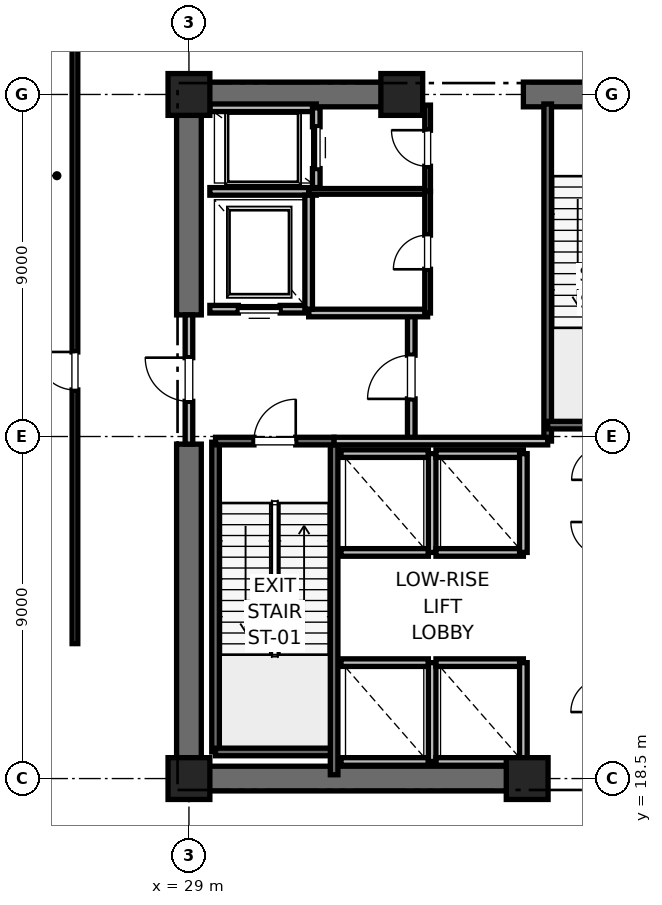
"""IFC4 building model, lengths in metres.
Left out: names, types, materials, properties, quantities, classifications, styles, units other than length and angle.
Written with IfcOpenShell. Run it as: python <this file> out.ifc"""

import sys

from ifc_helpers import new_model, si_unit, direction, frame, frame_2d, origin, origin_2d, place, context, subcontext, project, spatial, rectangle, extrude, element, fill, save


model = new_model("IFC4")
c1 = context("Model", 3, precision=1e-05, world=origin(), true_north=direction((0.0, 1.0)))
c2 = subcontext(c1, "Body", "Model", "MODEL_VIEW")
j1 = project(units=[si_unit("LENGTHUNIT", "METRE"), si_unit("PLANEANGLEUNIT", "RADIAN")], contexts=[c1])
p1 = place(None, origin())
s1 = spatial("IfcSite", under=j1, at=p1, CompositionType="ELEMENT")
p2 = place(p1, origin())
s2 = spatial("IfcBuilding", under=s1, at=p2, CompositionType="ELEMENT")
p3 = place(p2, frame((0.0, 0.0, 16.4)))
s3 = spatial("IfcBuildingStorey", under=s2, at=p3, CompositionType="ELEMENT", Elevation=16.4)
for number, where, z_axis, x_axis in (
    (1, (29.0, 18.5, 0.0), (0.0, 0.0, 1.0), (1.0, 0.0, 0.0)),
    (2, (29.0, 36.5, 0.0), (0.0, 0.0, 1.0), (1.0, 0.0, 0.0)),
    (3, (37.9, 18.5, 0.0), (0.0, 0.0, 1.0), (1.0, 0.0, 0.0)),
    (4, (34.6, 36.5, 0.0), (0.0, 0.0, 1.0), (1.0, 0.0, 0.0)),
):
    element("IfcColumn", number, at=place(p3, frame(where, z_axis=z_axis, x_axis=x_axis)), inside=s3, PredefinedType="PILASTER", context=c2, shape_type="SweptSolid", body=[
        extrude(rectangle(XDim=1.1, YDim=1.1, at=origin_2d()), origin(), (0.0, 0.0, 1.0), 5.2),
    ])
p4 = place(p3, frame((29.0, 18.5, 0.0), z_axis=(0.0, 0.0, 1.0), x_axis=(1.0, 0.0, 0.0)))
e5 = element("IfcWall", 5, at=p4, inside=s3, PredefinedType="SHEAR", context=c2, shape_type="SweptSolid", body=[
    extrude(rectangle(XDim=9.2, YDim=0.65, at=frame_2d((4.6, 0.0))), origin(), (0.0, 0.0, 1.0), 4.9),
])
p5 = place(p3, frame((29.0, 36.5, 0.0), z_axis=(0.0, 0.0, 1.0), x_axis=(1.0, 0.0, 0.0)))
e6 = element("IfcWall", 6, at=p5, inside=s3, PredefinedType="SHEAR", context=c2, shape_type="SweptSolid", body=[
    extrude(rectangle(XDim=5.8, YDim=0.65, at=frame_2d((2.9, 0.0))), origin(), (0.0, 0.0, 1.0), 4.9),
])
p6 = place(p3, frame((37.8, 36.5, 0.0), z_axis=(0.0, 0.0, 1.0), x_axis=(1.0, 0.0, 0.0)))
e7 = element("IfcWall", 7, at=p6, inside=s3, PredefinedType="SHEAR", context=c2, shape_type="SweptSolid", body=[
    extrude(rectangle(XDim=4.4, YDim=0.65, at=frame_2d((2.2, 0.0))), origin(), (0.0, 0.0, 1.0), 4.9),
])
p7 = place(p6, frame((1.65, 0.0, 0.0)))
e8 = element("IfcOpeningElement", 8, at=p7, cuts=e7, PredefinedType="OPENING", context=c2, shape_type="SweptSolid", body=[
    extrude(rectangle(XDim=1.1, YDim=2.15, at=frame_2d((0.55, 1.075))), frame((0.0, 0.325, 0.0), z_axis=(0.0, -1.0, 0.0), x_axis=(1.0, 0.0, 0.0)), (0.0, 0.0, 1.0), 0.65),
])
p8 = place(p3, frame((29.0, 18.5, 0.0), z_axis=(0.0, 0.0, 1.0), x_axis=(0.0, 1.0, 0.0)))
e9 = element("IfcWall", 9, at=p8, inside=s3, PredefinedType="SHEAR", context=c2, shape_type="SweptSolid", body=[
    extrude(rectangle(XDim=8.8, YDim=0.65, at=frame_2d((4.4, 0.0))), origin(), (0.0, 0.0, 1.0), 4.9),
])
p9 = place(p3, frame((29.0, 30.7, 0.0), z_axis=(0.0, 0.0, 1.0), x_axis=(0.0, 1.0, 0.0)))
e10 = element("IfcWall", 10, at=p9, inside=s3, PredefinedType="SHEAR", context=c2, shape_type="SweptSolid", body=[
    extrude(rectangle(XDim=5.8, YDim=0.65, at=frame_2d((2.9, 0.0))), origin(), (0.0, 0.0, 1.0), 4.9),
])
p10 = place(p3, frame((29.7, 19.2, 0.0), z_axis=(0.0, 0.0, 1.0), x_axis=(0.0, 1.0, 0.0)))
e11 = element("IfcWall", 11, at=p10, inside=s3, PredefinedType="SOLIDWALL", context=c2, shape_type="SweptSolid", body=[
    extrude(rectangle(XDim=8.15, YDim=0.2, at=frame_2d((4.075, 0.0))), origin(), (0.0, 0.0, 1.0), 4.9),
])
p11 = place(p3, frame((29.7, 19.2, 0.0), z_axis=(0.0, 0.0, 1.0), x_axis=(1.0, 0.0, 0.0)))
e12 = element("IfcWall", 12, at=p11, inside=s3, PredefinedType="SOLIDWALL", context=c2, shape_type="SweptSolid", body=[
    extrude(rectangle(XDim=3.12, YDim=0.2, at=frame_2d((1.56, 0.0))), origin(), (0.0, 0.0, 1.0), 4.9),
])
p12 = place(p3, frame((32.82, 18.6, 0.0), z_axis=(0.0, 0.0, 1.0), x_axis=(0.0, 1.0, 0.0)))
e13 = element("IfcWall", 13, at=p12, inside=s3, PredefinedType="SOLIDWALL", context=c2, shape_type="SweptSolid", body=[
    extrude(rectangle(XDim=8.78, YDim=0.2, at=frame_2d((4.39, 0.0))), origin(), (0.0, 0.0, 1.0), 4.9),
])
p13 = place(p3, frame((29.7, 27.38, 0.0), z_axis=(0.0, 0.0, 1.0), x_axis=(1.0, 0.0, 0.0)))
e14 = element("IfcWall", 14, at=p13, inside=s3, PredefinedType="SOLIDWALL", context=c2, shape_type="SweptSolid", body=[
    extrude(rectangle(XDim=3.12, YDim=0.2, at=frame_2d((1.56, 0.0))), origin(), (0.0, 0.0, 1.0), 4.9),
])
p14 = place(p13, frame((1.01, 0.0, 0.0)))
e15 = element("IfcOpeningElement", 15, at=p14, cuts=e14, PredefinedType="OPENING", context=c2, shape_type="SweptSolid", body=[
    extrude(rectangle(XDim=1.1, YDim=2.15, at=frame_2d((0.55, 1.075))), frame((0.0, 0.1, 0.0), z_axis=(0.0, -1.0, 0.0), x_axis=(1.0, 0.0, 0.0)), (0.0, 0.0, 1.0), 0.2),
])
p15 = place(p3, frame((38.44, 27.38, 0.0), z_axis=(0.0, 0.0, 1.0), x_axis=(0.0, 1.0, 0.0)))
e16 = element("IfcWall", 16, at=p15, inside=s3, PredefinedType="SOLIDWALL", context=c2, shape_type="SweptSolid", body=[
    extrude(rectangle(XDim=8.87, YDim=0.2, at=frame_2d((4.435, 0.0))), origin(), (0.0, 0.0, 1.0), 4.9),
])
p16 = place(p3, frame((38.44, 27.8, 0.0), z_axis=(0.0, 0.0, 1.0), x_axis=(1.0, 0.0, 0.0)))
e17 = element("IfcWall", 17, at=p16, inside=s3, PredefinedType="SOLIDWALL", context=c2, shape_type="SweptSolid", body=[
    extrude(rectangle(XDim=3.32, YDim=0.2, at=frame_2d((1.66, 0.0))), origin(), (0.0, 0.0, 1.0), 4.9),
])
p17 = place(p3, frame((34.85, 27.38, 0.0), z_axis=(0.0, 0.0, 1.0), x_axis=(0.0, 1.0, 0.0)))
e18 = element("IfcWall", 18, at=p17, inside=s3, PredefinedType="PARTITIONING", context=c2, shape_type="SweptSolid", body=[
    extrude(rectangle(XDim=3.37, YDim=0.2, at=frame_2d((1.685, 0.0))), origin(), (0.0, 0.0, 1.0), 4.9),
])
p18 = place(p17, frame((1.11, 0.0, 0.0)))
e19 = element("IfcOpeningElement", 19, at=p18, cuts=e18, PredefinedType="OPENING", context=c2, shape_type="SweptSolid", body=[
    extrude(rectangle(XDim=1.15, YDim=2.2, at=frame_2d((0.575, 1.1))), frame((0.0, 0.1, 0.0), z_axis=(0.0, -1.0, 0.0), x_axis=(1.0, 0.0, 0.0)), (0.0, 0.0, 1.0), 0.2),
])
p19 = place(p3, frame((29.0, 27.3, 0.0), z_axis=(0.0, 0.0, 1.0), x_axis=(0.0, 1.0, 0.0)))
e20 = element("IfcWall", 20, at=p19, inside=s3, PredefinedType="PARTITIONING", context=c2, shape_type="SweptSolid", body=[
    extrude(rectangle(XDim=3.4, YDim=0.2, at=frame_2d((1.7, 0.0))), origin(), (0.0, 0.0, 1.0), 3.68),
])
p20 = place(p19, frame((1.125, 0.0, 0.0)))
e21 = element("IfcOpeningElement", 21, at=p20, cuts=e20, PredefinedType="OPENING", context=c2, shape_type="SweptSolid", body=[
    extrude(rectangle(XDim=1.15, YDim=2.2, at=frame_2d((0.575, 1.1))), frame((0.0, 0.1, 0.0), z_axis=(0.0, -1.0, 0.0), x_axis=(1.0, 0.0, 0.0)), (0.0, 0.0, 1.0), 0.2),
])
p21 = place(p3, frame((32.82, 27.38, 0.0), z_axis=(0.0, 0.0, 1.0), x_axis=(1.0, 0.0, 0.0)))
e22 = element("IfcWall", 22, at=p21, inside=s3, PredefinedType="PARTITIONING", context=c2, shape_type="SweptSolid", body=[
    extrude(rectangle(XDim=5.62, YDim=0.2, at=frame_2d((2.81, 0.0))), origin(), (0.0, 0.0, 1.0), 4.9),
])
p22 = place(p3, frame((32.15, 30.75, 0.0), z_axis=(0.0, 0.0, 1.0), x_axis=(1.0, 0.0, 0.0)))
e23 = element("IfcWall", 23, at=p22, inside=s3, PredefinedType="PARTITIONING", context=c2, shape_type="SweptSolid", body=[
    extrude(rectangle(XDim=3.13, YDim=0.2, at=frame_2d((1.565, 0.0))), origin(), (0.0, 0.0, 1.0), 4.9),
])
p23 = place(p3, frame((29.55, 30.85, 0.0), z_axis=(0.0, 0.0, 1.0), x_axis=(1.0, 0.0, 0.0)))
e24 = element("IfcWall", 24, at=p23, inside=s3, PredefinedType="SOLIDWALL", context=c2, shape_type="SweptSolid", body=[
    extrude(rectangle(XDim=2.6, YDim=0.2, at=frame_2d((1.3, 0.0))), origin(), (0.0, 0.0, 1.0), 3.68),
])
p24 = place(p23, frame((0.75, 0.0, 0.0)))
e25 = element("IfcOpeningElement", 25, at=p24, cuts=e24, PredefinedType="OPENING", context=c2, shape_type="SweptSolid", body=[
    extrude(rectangle(XDim=1.1, YDim=2.2, at=frame_2d((0.55, 1.1))), frame((0.0, 0.1, 0.0), z_axis=(0.0, -1.0, 0.0), x_axis=(1.0, 0.0, 0.0)), (0.0, 0.0, 1.0), 0.2),
])
p25 = place(p3, frame((29.55, 33.95, 0.0), z_axis=(0.0, 0.0, 1.0), x_axis=(1.0, 0.0, 0.0)))
e26 = element("IfcWall", 26, at=p25, inside=s3, PredefinedType="SOLIDWALL", context=c2, shape_type="SweptSolid", body=[
    extrude(rectangle(XDim=2.8, YDim=0.2, at=frame_2d((1.4, 0.0))), origin(), (0.0, 0.0, 1.0), 4.9),
])
p26 = place(p3, frame((32.15, 30.85, 0.0), z_axis=(0.0, 0.0, 1.0), x_axis=(0.0, 1.0, 0.0)))
e27 = element("IfcWall", 27, at=p26, inside=s3, PredefinedType="SOLIDWALL", context=c2, shape_type="SweptSolid", body=[
    extrude(rectangle(XDim=3.0, YDim=0.2, at=frame_2d((1.5, 0.0))), origin(), (0.0, 0.0, 1.0), 4.9),
])
p27 = place(p3, frame((32.35, 36.15, 0.0), z_axis=(0.0, 0.0, 1.0), x_axis=(-1.0, 0.0, 0.0)))
e28 = element("IfcWall", 28, at=p27, inside=s3, PredefinedType="SOLIDWALL", context=c2, shape_type="SweptSolid", body=[
    extrude(rectangle(XDim=2.8, YDim=0.2, at=frame_2d((1.4, 0.0))), origin(), (0.0, 0.0, 1.0), 3.959),
])
p28 = place(p3, frame((32.35, 34.05, 0.0), z_axis=(0.0, 0.0, 1.0), x_axis=(0.0, 1.0, 0.0)))
e29 = element("IfcWall", 29, at=p28, inside=s3, PredefinedType="SOLIDWALL", context=c2, shape_type="SweptSolid", body=[
    extrude(rectangle(XDim=2.1, YDim=0.2, at=frame_2d((1.05, 0.0))), origin(), (0.0, 0.0, 1.0), 4.9),
])
p29 = place(p28, frame((0.5, 0.0, 0.0)))
e30 = element("IfcOpeningElement", 30, at=p29, cuts=e29, PredefinedType="OPENING", context=c2, shape_type="SweptSolid", body=[
    extrude(rectangle(XDim=1.1, YDim=2.2, at=frame_2d((0.55, 1.1))), frame((0.0, 0.1, 0.0), z_axis=(0.0, -1.0, 0.0), x_axis=(1.0, 0.0, 0.0)), (0.0, 0.0, 1.0), 0.2),
])
for number, where, z_axis, x_axis in (
    (31, (33.0, 18.95, 0.0), (0.0, 0.0, 1.0), (1.0, 0.0, 0.0)),
    (32, (35.3, 21.55, 0.0), (0.0, 0.0, 1.0), (-1.0, 0.0, 0.0)),
):
    element("IfcWall", number, at=place(p3, frame(where, z_axis=z_axis, x_axis=x_axis)), inside=s3, PredefinedType="SOLIDWALL", context=c2, shape_type="SweptSolid", body=[
        extrude(rectangle(XDim=2.3, YDim=0.2, at=frame_2d((1.15, 0.0))), origin(), (0.0, 0.0, 1.0), 4.9),
    ])
p30 = place(p3, frame((35.4, 18.95, 0.0), z_axis=(0.0, 0.0, 1.0), x_axis=(0.0, 1.0, 0.0)))
e33 = element("IfcWall", 33, at=p30, inside=s3, PredefinedType="SOLIDWALL", context=c2, shape_type="SweptSolid", body=[
    extrude(rectangle(XDim=2.6, YDim=0.2, at=frame_2d((1.3, 0.0))), origin(), (0.0, 0.0, 1.0), 4.9),
])
p31 = place(p3, frame((35.5, 18.95, 0.0), z_axis=(0.0, 0.0, 1.0), x_axis=(1.0, 0.0, 0.0)))
e34 = element("IfcWall", 34, at=p31, inside=s3, PredefinedType="SOLIDWALL", context=c2, shape_type="SweptSolid", body=[
    extrude(rectangle(XDim=2.3, YDim=0.2, at=frame_2d((1.15, 0.0))), origin(), (0.0, 0.0, 1.0), 3.68),
])
p32 = place(p3, frame((37.8, 21.55, 0.0), z_axis=(0.0, 0.0, 1.0), x_axis=(-1.0, 0.0, 0.0)))
e35 = element("IfcWall", 35, at=p32, inside=s3, PredefinedType="SOLIDWALL", context=c2, shape_type="SweptSolid", body=[
    extrude(rectangle(XDim=2.3, YDim=0.2, at=frame_2d((1.15, 0.0))), origin(), (0.0, 0.0, 1.0), 4.9),
])
p33 = place(p3, frame((37.8, 18.95, 0.0), z_axis=(0.0, 0.0, 1.0), x_axis=(0.0, 1.0, 0.0)))
e36 = element("IfcWall", 36, at=p33, inside=s3, PredefinedType="SOLIDWALL", context=c2, shape_type="SweptSolid", body=[
    extrude(rectangle(XDim=2.6, YDim=0.2, at=frame_2d((1.3, 0.0))), origin(), (0.0, 0.0, 1.0), 3.68),
])
for number, where, z_axis, x_axis in (
    (37, (33.0, 24.45, 0.0), (0.0, 0.0, 1.0), (1.0, 0.0, 0.0)),
    (38, (35.3, 27.05, 0.0), (0.0, 0.0, 1.0), (-1.0, 0.0, 0.0)),
):
    element("IfcWall", number, at=place(p3, frame(where, z_axis=z_axis, x_axis=x_axis)), inside=s3, PredefinedType="SOLIDWALL", context=c2, shape_type="SweptSolid", body=[
        extrude(rectangle(XDim=2.3, YDim=0.2, at=frame_2d((1.15, 0.0))), origin(), (0.0, 0.0, 1.0), 4.9),
    ])
p34 = place(p3, frame((35.4, 24.45, 0.0), z_axis=(0.0, 0.0, 1.0), x_axis=(0.0, 1.0, 0.0)))
e39 = element("IfcWall", 39, at=p34, inside=s3, PredefinedType="SOLIDWALL", context=c2, shape_type="SweptSolid", body=[
    extrude(rectangle(XDim=2.6, YDim=0.2, at=frame_2d((1.3, 0.0))), origin(), (0.0, 0.0, 1.0), 4.9),
])
for number, where, z_axis, x_axis in (
    (40, (35.5, 24.45, 0.0), (0.0, 0.0, 1.0), (1.0, 0.0, 0.0)),
    (41, (37.8, 27.05, 0.0), (0.0, 0.0, 1.0), (-1.0, 0.0, 0.0)),
):
    element("IfcWall", number, at=place(p3, frame(where, z_axis=z_axis, x_axis=x_axis)), inside=s3, PredefinedType="SOLIDWALL", context=c2, shape_type="SweptSolid", body=[
        extrude(rectangle(XDim=2.3, YDim=0.2, at=frame_2d((1.15, 0.0))), origin(), (0.0, 0.0, 1.0), 4.9),
    ])
p35 = place(p3, frame((37.8, 24.45, 0.0), z_axis=(0.0, 0.0, 1.0), x_axis=(0.0, 1.0, 0.0)))
e42 = element("IfcWall", 42, at=p35, inside=s3, PredefinedType="SOLIDWALL", context=c2, shape_type="SweptSolid", body=[
    extrude(rectangle(XDim=2.6, YDim=0.2, at=frame_2d((1.3, 0.0))), origin(), (0.0, 0.0, 1.0), 4.9),
])
p36 = place(p3, frame((32.15, 33.95, 0.0), z_axis=(0.0, 0.0, 1.0), x_axis=(1.0, 0.0, 0.0)))
e43 = element("IfcWall", 43, at=p36, inside=s3, PredefinedType="PARTITIONING", context=c2, shape_type="SweptSolid", body=[
    extrude(rectangle(XDim=3.13, YDim=0.15, at=frame_2d((1.565, 0.0))), origin(), (0.0, 0.0, 1.0), 2.85),
])
p37 = place(p3, frame((35.28, 33.95, 0.0), z_axis=(0.0, 0.0, 1.0), x_axis=(0.0, 1.0, 0.0)))
e44 = element("IfcWall", 44, at=p37, inside=s3, PredefinedType="PARTITIONING", context=c2, shape_type="SweptSolid", body=[
    extrude(rectangle(XDim=2.27, YDim=0.15, at=frame_2d((1.135, 0.0))), origin(), (0.0, 0.0, 1.0), 2.85),
])
p38 = place(p37, frame((0.66, 0.0, 0.0)))
e45 = element("IfcOpeningElement", 45, at=p38, cuts=e44, PredefinedType="OPENING", context=c2, shape_type="SweptSolid", body=[
    extrude(rectangle(XDim=0.95, YDim=2.15, at=frame_2d((0.475, 1.075))), frame((0.0, 0.075, 0.0), z_axis=(0.0, -1.0, 0.0), x_axis=(1.0, 0.0, 0.0)), (0.0, 0.0, 1.0), 0.15),
])
p39 = place(p3, frame((35.28, 30.75, 0.0), z_axis=(0.0, 0.0, 1.0), x_axis=(0.0, 1.0, 0.0)))
e46 = element("IfcWall", 46, at=p39, inside=s3, PredefinedType="PARTITIONING", context=c2, shape_type="SweptSolid", body=[
    extrude(rectangle(XDim=3.2, YDim=0.15, at=frame_2d((1.6, 0.0))), origin(), (0.0, 0.0, 1.0), 2.85),
])
p40 = place(p39, frame((1.15, 0.0, 0.0)))
e47 = element("IfcOpeningElement", 47, at=p40, cuts=e46, PredefinedType="OPENING", context=c2, shape_type="SweptSolid", body=[
    extrude(rectangle(XDim=0.9, YDim=2.1, at=frame_2d((0.45, 1.05))), frame((0.0, 0.075, 0.0), z_axis=(0.0, -1.0, 0.0), x_axis=(1.0, 0.0, 0.0)), (0.0, 0.0, 1.0), 0.15),
])
p41 = place(p3, frame((26.0, 22.05, 0.0), z_axis=(0.0, 0.0, 1.0), x_axis=(0.0, 1.0, 0.0)))
e48 = element("IfcWall", 48, at=p41, inside=s3, PredefinedType="PARTITIONING", context=c2, shape_type="SweptSolid", body=[
    extrude(rectangle(XDim=16.95, YDim=0.15, at=frame_2d((8.475, 0.0))), origin(), (0.0, 0.0, 1.0), 2.85),
])
p42 = place(p41, frame((6.675, 0.0, 0.0)))
e49 = element("IfcOpeningElement", 49, at=p42, cuts=e48, PredefinedType="OPENING", context=c2, shape_type="SweptSolid", body=[
    extrude(rectangle(XDim=1.0, YDim=2.15, at=frame_2d((0.5, 1.075))), frame((0.0, 0.075, 0.0), z_axis=(0.0, -1.0, 0.0), x_axis=(1.0, 0.0, 0.0)), (0.0, 0.0, 1.0), 0.15),
])
p43 = place(p14, origin())
e50 = element("IfcDoor", 50, at=p43, inside=s3, OperationType="SINGLE_SWING_RIGHT", PredefinedType="DOOR", context=c2, shape_type="SweptSolid", body=[
    extrude(rectangle(XDim=1.1, YDim=2.15, at=frame_2d((0.55, 1.075))), frame((0.0, 0.025, 0.0), z_axis=(0.0, -1.0, 0.0), x_axis=(1.0, 0.0, 0.0)), (0.0, 0.0, 1.0), 0.05),
])
fill(e15, e50)
p44 = place(p18, origin())
e51 = element("IfcDoor", 51, at=p44, inside=s3, OperationType="SINGLE_SWING_LEFT", PredefinedType="DOOR", context=c2, shape_type="SweptSolid", body=[
    extrude(rectangle(XDim=1.15, YDim=2.2, at=frame_2d((0.575, 1.1))), frame((0.0, 0.025, 0.0), z_axis=(0.0, -1.0, 0.0), x_axis=(1.0, 0.0, 0.0)), (0.0, 0.0, 1.0), 0.05),
])
fill(e19, e51)
p45 = place(p20, origin())
e52 = element("IfcDoor", 52, at=p45, inside=s3, OperationType="SINGLE_SWING_RIGHT", PredefinedType="DOOR", context=c2, shape_type="SweptSolid", body=[
    extrude(rectangle(XDim=1.15, YDim=2.2, at=frame_2d((0.575, 1.1))), frame((0.0, 0.025, 0.0), z_axis=(0.0, -1.0, 0.0), x_axis=(1.0, 0.0, 0.0)), (0.0, 0.0, 1.0), 0.05),
])
fill(e21, e52)
p46 = place(p24, origin())
e53 = element("IfcDoor", 53, at=p46, inside=s3, OperationType="SLIDING_TO_RIGHT", PredefinedType="DOOR", context=c2, shape_type="SweptSolid", body=[
    extrude(rectangle(XDim=1.1, YDim=2.2, at=frame_2d((0.55, 1.1))), frame((0.0, 0.025, 0.0), z_axis=(0.0, -1.0, 0.0), x_axis=(1.0, 0.0, 0.0)), (0.0, 0.0, 1.0), 0.05),
])
fill(e25, e53)
p47 = place(p29, origin())
e54 = element("IfcDoor", 54, at=p47, inside=s3, OperationType="SLIDING_TO_RIGHT", PredefinedType="DOOR", context=c2, shape_type="SweptSolid", body=[
    extrude(rectangle(XDim=1.1, YDim=2.2, at=frame_2d((0.55, 1.1))), frame((0.0, 0.025, 0.0), z_axis=(0.0, -1.0, 0.0), x_axis=(1.0, 0.0, 0.0)), (0.0, 0.0, 1.0), 0.05),
])
fill(e30, e54)
p48 = place(p38, origin())
e55 = element("IfcDoor", 55, at=p48, inside=s3, OperationType="SINGLE_SWING_RIGHT", PredefinedType="DOOR", context=c2, shape_type="SweptSolid", body=[
    extrude(rectangle(XDim=0.95, YDim=2.15, at=frame_2d((0.475, 1.075))), frame((0.0, 0.025, 0.0), z_axis=(0.0, -1.0, 0.0), x_axis=(1.0, 0.0, 0.0)), (0.0, 0.0, 1.0), 0.05),
])
fill(e45, e55)
p49 = place(p40, origin())
e56 = element("IfcDoor", 56, at=p49, inside=s3, OperationType="SINGLE_SWING_LEFT", PredefinedType="DOOR", context=c2, shape_type="SweptSolid", body=[
    extrude(rectangle(XDim=0.9, YDim=2.1, at=frame_2d((0.45, 1.05))), frame((0.0, 0.025, 0.0), z_axis=(0.0, -1.0, 0.0), x_axis=(1.0, 0.0, 0.0)), (0.0, 0.0, 1.0), 0.05),
])
fill(e47, e56)
p50 = place(p42, origin())
e57 = element("IfcDoor", 57, at=p50, inside=s3, OperationType="SINGLE_SWING_RIGHT", PredefinedType="DOOR", context=c2, shape_type="SweptSolid", body=[
    extrude(rectangle(XDim=1.0, YDim=2.15, at=frame_2d((0.5, 1.075))), frame((0.0, 0.025, 0.0), z_axis=(0.0, -1.0, 0.0), x_axis=(1.0, 0.0, 0.0)), (0.0, 0.0, 1.0), 0.05),
])
fill(e49, e57)
save(model, sys.argv[1])
